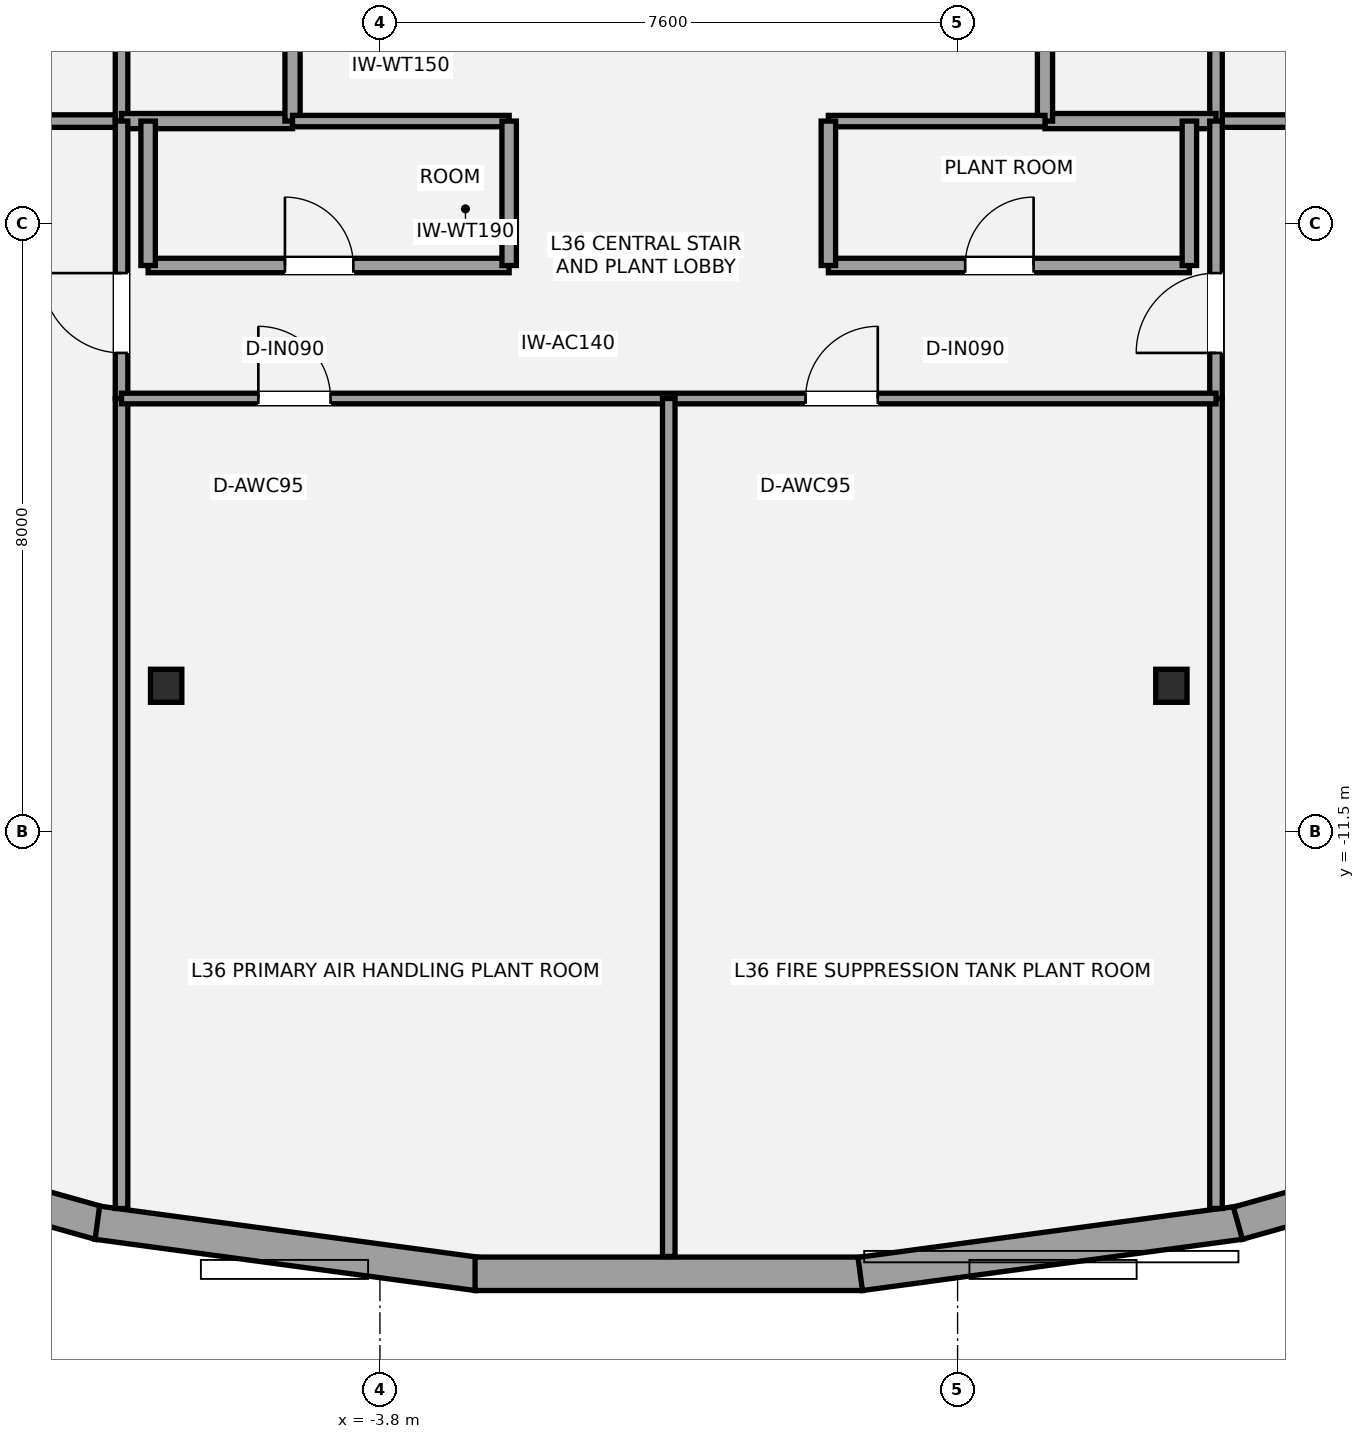
"""IFC4 building model, lengths in metres.
Left out: names, types, materials, properties, quantities, classifications, styles, units other than length and angle.
Written with IfcOpenShell. Run it as: python <this file> out.ifc"""

import sys

from ifc_helpers import new_model, si_unit, direction, frame, frame_2d, origin, origin_2d, place, context, subcontext, project, spatial, rectangle, i_section, extrude, element, fill, save


model = new_model("IFC4")
c1 = context("Model", 3, precision=1e-05, world=origin(), true_north=direction((0.0, 1.0)))
c2 = subcontext(c1, "Body", "Model", "MODEL_VIEW")
j1 = project(units=[si_unit("LENGTHUNIT", "METRE"), si_unit("PLANEANGLEUNIT", "RADIAN")], contexts=[c1])
p1 = place(None, origin())
s1 = spatial("IfcSite", under=j1, at=p1, CompositionType="ELEMENT")
p2 = place(p1, origin())
s2 = spatial("IfcBuilding", under=s1, at=p2, CompositionType="ELEMENT")
p3 = place(p2, frame((0.0, 0.0, 135.1)))
s3 = spatial("IfcBuildingStorey", under=s2, at=p3, CompositionType="ELEMENT", Elevation=135.1)
for number, where, z_axis, x_axis in (
    (1, (-6.613, -9.579, 0.0), (0.0, 0.0, 1.0), (1.0, 0.0, 0.0)),
    (2, (6.613, -9.579, 0.0), (0.0, 0.0, 1.0), (1.0, 0.0, 0.0)),
):
    element("IfcColumn", number, at=place(p3, frame(where, z_axis=z_axis, x_axis=x_axis)), inside=s3, PredefinedType="COLUMN", context=c2, shape_type="SweptSolid", body=[
        extrude(i_section(OverallWidth=0.412, OverallDepth=0.435, WebThickness=0.036, FlangeThickness=0.057, at=origin_2d()), origin(), (0.0, 0.0, 1.0), 4.5),
    ])
p4 = place(p3, frame((-7.488, -16.649, 0.0), z_axis=(0.0, 0.0, 1.0), x_axis=(-0.962790668442, 0.270248272446, 0.0)))
e3 = element("IfcWall", 3, at=p4, inside=s3, PredefinedType="STANDARD", context=c2, shape_type="SweptSolid", body=[
    extrude(rectangle(XDim=4.891, YDim=0.44, at=frame_2d((2.445, 0.0))), origin(), (0.0, 0.0, 1.0), 3.498),
])
p5 = place(p3, frame((-2.519, -17.317, 0.0), z_axis=(0.0, 0.0, 1.0), x_axis=(-0.99103751038, 0.133583880086, 0.0)))
e4 = element("IfcWall", 4, at=p5, inside=s3, PredefinedType="STANDARD", context=c2, shape_type="SweptSolid", body=[
    extrude(rectangle(XDim=5.044, YDim=0.44, at=frame_2d((2.522, 0.0))), origin(), (0.0, 0.0, 1.0), 3.498),
])
p6 = place(p3, frame((2.548, -17.315, 0.0), z_axis=(0.0, 0.0, 1.0), x_axis=(-1.0, 0.0, 0.0)))
e5 = element("IfcWall", 5, at=p6, inside=s3, PredefinedType="STANDARD", context=c2, shape_type="SweptSolid", body=[
    extrude(rectangle(XDim=5.097, YDim=0.44, at=frame_2d((2.548, 0.0))), origin(), (0.0, 0.0, 1.0), 3.498),
])
p7 = place(p3, frame((7.518, -16.643, 0.0), z_axis=(0.0, 0.0, 1.0), x_axis=(-0.99103751038, -0.133583880086, 0.0)))
e6 = element("IfcWall", 6, at=p7, inside=s3, PredefinedType="STANDARD", context=c2, shape_type="SweptSolid", body=[
    extrude(rectangle(XDim=5.044, YDim=0.44, at=frame_2d((2.522, 0.0))), origin(), (0.0, 0.0, 1.0), 3.498),
])
p8 = place(p3, frame((12.197, -15.328, 0.0), z_axis=(0.0, 0.0, 1.0), x_axis=(-0.962790668442, -0.270248272446, 0.0)))
e7 = element("IfcWall", 7, at=p8, inside=s3, PredefinedType="STANDARD", context=c2, shape_type="SweptSolid", body=[
    extrude(rectangle(XDim=4.891, YDim=0.44, at=frame_2d((2.445, 0.0))), origin(), (0.0, 0.0, 1.0), 3.498),
])
p9 = place(p3, frame((-13.45, -2.15, 0.0), z_axis=(0.0, 0.0, 1.0), x_axis=(1.0, 0.0, 0.0)))
e8 = element("IfcWall", 8, at=p9, inside=s3, PredefinedType="PARTITIONING", context=c2, shape_type="SweptSolid", body=[
    extrude(rectangle(XDim=6.25, YDim=0.165, at=frame_2d((3.125, 0.0))), origin(), (0.0, 0.0, 1.0), 4.28),
])
p10 = place(p9, frame((2.6, 0.0, 0.0)))
e9 = element("IfcOpeningElement", 9, at=p10, cuts=e8, PredefinedType="OPENING", context=c2, shape_type="SweptSolid", body=[
    extrude(rectangle(XDim=1.05, YDim=2.15, at=frame_2d((0.525, 1.075))), frame((0.0, 0.093, 0.0), z_axis=(0.0, -1.0, 0.0), x_axis=(1.0, 0.0, 0.0)), (0.0, 0.0, 1.0), 0.185),
])
p11 = place(p3, frame((-7.2, -2.15, 0.0), z_axis=(0.0, 0.0, 1.0), x_axis=(0.0, 1.0, 0.0)))
e10 = element("IfcWall", 10, at=p11, inside=s3, PredefinedType="PARTITIONING", context=c2, shape_type="SweptSolid", body=[
    extrude(rectangle(XDim=3.4, YDim=0.165, at=frame_2d((1.7, 0.0))), origin(), (0.0, 0.0, 1.0), 3.733),
])
p12 = place(p3, frame((-7.2, -2.15, 0.0), z_axis=(0.0, 0.0, 1.0), x_axis=(1.0, 0.0, 0.0)))
e11 = element("IfcWall", 11, at=p12, inside=s3, PredefinedType="SOLIDWALL", context=c2, shape_type="SweptSolid", body=[
    extrude(rectangle(XDim=2.25, YDim=0.2, at=frame_2d((1.125, 0.0))), origin(), (0.0, 0.0, 1.0), 2.47),
])
p13 = place(p3, frame((-4.95, -2.15, 0.0), z_axis=(0.0, 0.0, 1.0), x_axis=(0.0, 1.0, 0.0)))
e12 = element("IfcWall", 12, at=p13, inside=s3, PredefinedType="SOLIDWALL", context=c2, shape_type="SweptSolid", body=[
    extrude(rectangle(XDim=3.4, YDim=0.2, at=frame_2d((1.7, 0.0))), origin(), (0.0, 0.0, 1.0), 2.47),
])
p14 = place(p13, frame((0.95, 0.0, 0.0)))
e13 = element("IfcOpeningElement", 13, at=p14, cuts=e12, PredefinedType="OPENING", context=c2, shape_type="SweptSolid", body=[
    extrude(rectangle(XDim=0.75, YDim=2.1, at=frame_2d((0.375, 1.05))), frame((0.0, 0.11, 0.0), z_axis=(0.0, -1.0, 0.0), x_axis=(1.0, 0.0, 0.0)), (0.0, 0.0, 1.0), 0.22),
])
p15 = place(p3, frame((7.2, -2.15, 0.0), z_axis=(0.0, 0.0, 1.0), x_axis=(1.0, 0.0, 0.0)))
e14 = element("IfcWall", 14, at=p15, inside=s3, PredefinedType="PARTITIONING", context=c2, shape_type="SweptSolid", body=[
    extrude(rectangle(XDim=6.25, YDim=0.165, at=frame_2d((3.125, 0.0))), origin(), (0.0, 0.0, 1.0), 4.28),
])
p16 = place(p15, frame((1.4, 0.0, 0.0)))
e15 = element("IfcOpeningElement", 15, at=p16, cuts=e14, PredefinedType="OPENING", context=c2, shape_type="SweptSolid", body=[
    extrude(rectangle(XDim=1.05, YDim=2.15, at=frame_2d((0.525, 1.075))), frame((0.0, 0.093, 0.0), z_axis=(0.0, -1.0, 0.0), x_axis=(1.0, 0.0, 0.0)), (0.0, 0.0, 1.0), 0.185),
])
p17 = place(p3, frame((7.2, -2.15, 0.0), z_axis=(0.0, 0.0, 1.0), x_axis=(0.0, 1.0, 0.0)))
e16 = element("IfcWall", 16, at=p17, inside=s3, PredefinedType="PARTITIONING", context=c2, shape_type="SweptSolid", body=[
    extrude(rectangle(XDim=3.4, YDim=0.165, at=frame_2d((1.7, 0.0))), origin(), (0.0, 0.0, 1.0), 4.28),
])
p18 = place(p3, frame((4.95, -2.15, 0.0), z_axis=(0.0, 0.0, 1.0), x_axis=(1.0, 0.0, 0.0)))
e17 = element("IfcWall", 17, at=p18, inside=s3, PredefinedType="SOLIDWALL", context=c2, shape_type="SweptSolid", body=[
    extrude(rectangle(XDim=2.25, YDim=0.2, at=frame_2d((1.125, 0.0))), origin(), (0.0, 0.0, 1.0), 2.47),
])
p19 = place(p3, frame((4.95, -2.15, 0.0), z_axis=(0.0, 0.0, 1.0), x_axis=(0.0, 1.0, 0.0)))
e18 = element("IfcWall", 18, at=p19, inside=s3, PredefinedType="SOLIDWALL", context=c2, shape_type="SweptSolid", body=[
    extrude(rectangle(XDim=3.4, YDim=0.2, at=frame_2d((1.7, 0.0))), origin(), (0.0, 0.0, 1.0), 2.47),
])
p20 = place(p19, frame((0.95, 0.0, 0.0)))
e19 = element("IfcOpeningElement", 19, at=p20, cuts=e18, PredefinedType="OPENING", context=c2, shape_type="SweptSolid", body=[
    extrude(rectangle(XDim=0.75, YDim=2.1, at=frame_2d((0.375, 1.05))), frame((0.0, 0.11, 0.0), z_axis=(0.0, -1.0, 0.0), x_axis=(1.0, 0.0, 0.0)), (0.0, 0.0, 1.0), 0.22),
])
p21 = place(p3, frame((-6.85, -4.05, 0.0), z_axis=(0.0, 0.0, 1.0), x_axis=(1.0, 0.0, 0.0)))
e20 = element("IfcWall", 20, at=p21, inside=s3, PredefinedType="PLUMBINGWALL", context=c2, shape_type="SweptSolid", body=[
    extrude(rectangle(XDim=4.75, YDim=0.19, at=frame_2d((2.375, 0.0))), origin(), (0.0, 0.0, 1.0), 2.47),
])
p22 = place(p21, frame((1.8, 0.0, 0.0)))
e21 = element("IfcOpeningElement", 21, at=p22, cuts=e20, PredefinedType="OPENING", context=c2, shape_type="SweptSolid", body=[
    extrude(rectangle(XDim=0.9, YDim=2.1, at=frame_2d((0.45, 1.05))), frame((0.0, 0.105, 0.0), z_axis=(0.0, -1.0, 0.0), x_axis=(1.0, 0.0, 0.0)), (0.0, 0.0, 1.0), 0.21),
])
p23 = place(p3, frame((-4.95, -2.15, 0.0), z_axis=(0.0, 0.0, 1.0), x_axis=(1.0, 0.0, 0.0)))
e22 = element("IfcWall", 22, at=p23, inside=s3, PredefinedType="PLUMBINGWALL", context=c2, shape_type="SweptSolid", body=[
    extrude(rectangle(XDim=2.85, YDim=0.15, at=frame_2d((1.425, 0.0))), origin(), (0.0, 0.0, 1.0), 3.733),
])
p24 = place(p3, frame((-6.85, -4.05, 0.0), z_axis=(0.0, 0.0, 1.0), x_axis=(0.0, 1.0, 0.0)))
e23 = element("IfcWall", 23, at=p24, inside=s3, PredefinedType="PLUMBINGWALL", context=c2, shape_type="SweptSolid", body=[
    extrude(rectangle(XDim=1.9, YDim=0.19, at=frame_2d((0.95, 0.0))), origin(), (0.0, 0.0, 1.0), 4.28),
])
p25 = place(p3, frame((-2.1, -4.05, 0.0), z_axis=(0.0, 0.0, 1.0), x_axis=(0.0, 1.0, 0.0)))
e24 = element("IfcWall", 24, at=p25, inside=s3, PredefinedType="PLUMBINGWALL", context=c2, shape_type="SweptSolid", body=[
    extrude(rectangle(XDim=1.9, YDim=0.19, at=frame_2d((0.95, 0.0))), origin(), (0.0, 0.0, 1.0), 3.733),
])
p26 = place(p3, frame((2.1, -4.05, 0.0), z_axis=(0.0, 0.0, 1.0), x_axis=(1.0, 0.0, 0.0)))
e25 = element("IfcWall", 25, at=p26, inside=s3, PredefinedType="PLUMBINGWALL", context=c2, shape_type="SweptSolid", body=[
    extrude(rectangle(XDim=4.75, YDim=0.19, at=frame_2d((2.375, 0.0))), origin(), (0.0, 0.0, 1.0), 2.47),
])
p27 = place(p26, frame((1.8, 0.0, 0.0)))
e26 = element("IfcOpeningElement", 26, at=p27, cuts=e25, PredefinedType="OPENING", context=c2, shape_type="SweptSolid", body=[
    extrude(rectangle(XDim=0.9, YDim=2.1, at=frame_2d((0.45, 1.05))), frame((0.0, 0.105, 0.0), z_axis=(0.0, -1.0, 0.0), x_axis=(1.0, 0.0, 0.0)), (0.0, 0.0, 1.0), 0.21),
])
p28 = place(p3, frame((2.1, -2.15, 0.0), z_axis=(0.0, 0.0, 1.0), x_axis=(1.0, 0.0, 0.0)))
e27 = element("IfcWall", 27, at=p28, inside=s3, PredefinedType="PLUMBINGWALL", context=c2, shape_type="SweptSolid", body=[
    extrude(rectangle(XDim=2.85, YDim=0.15, at=frame_2d((1.425, 0.0))), origin(), (0.0, 0.0, 1.0), 4.28),
])
for number, where, z_axis, x_axis in (
    (28, (2.1, -4.05, 0.0), (0.0, 0.0, 1.0), (0.0, 1.0, 0.0)),
    (29, (6.85, -4.05, 0.0), (0.0, 0.0, 1.0), (0.0, 1.0, 0.0)),
):
    element("IfcWall", number, at=place(p3, frame(where, z_axis=z_axis, x_axis=x_axis)), inside=s3, PredefinedType="PLUMBINGWALL", context=c2, shape_type="SweptSolid", body=[
        extrude(rectangle(XDim=1.9, YDim=0.19, at=frame_2d((0.95, 0.0))), origin(), (0.0, 0.0, 1.0), 4.28),
    ])
p29 = place(p3, frame((-7.2, -5.8, 0.0), z_axis=(0.0, 0.0, 1.0), x_axis=(0.0, 1.0, 0.0)))
e30 = element("IfcWall", 30, at=p29, inside=s3, PredefinedType="PARTITIONING", context=c2, shape_type="SweptSolid", body=[
    extrude(rectangle(XDim=3.65, YDim=0.165, at=frame_2d((1.825, 0.0))), origin(), (0.0, 0.0, 1.0), 3.733),
])
p30 = place(p29, frame((0.6, 0.0, 0.0)))
e31 = element("IfcOpeningElement", 31, at=p30, cuts=e30, PredefinedType="OPENING", context=c2, shape_type="SweptSolid", body=[
    extrude(rectangle(XDim=1.05, YDim=2.15, at=frame_2d((0.525, 1.075))), frame((0.0, 0.093, 0.0), z_axis=(0.0, -1.0, 0.0), x_axis=(1.0, 0.0, 0.0)), (0.0, 0.0, 1.0), 0.185),
])
p31 = place(p3, frame((7.2, -5.8, 0.0), z_axis=(0.0, 0.0, 1.0), x_axis=(0.0, 1.0, 0.0)))
e32 = element("IfcWall", 32, at=p31, inside=s3, PredefinedType="PARTITIONING", context=c2, shape_type="SweptSolid", body=[
    extrude(rectangle(XDim=3.65, YDim=0.165, at=frame_2d((1.825, 0.0))), origin(), (0.0, 0.0, 1.0), 4.28),
])
p32 = place(p31, frame((0.6, 0.0, 0.0)))
e33 = element("IfcOpeningElement", 33, at=p32, cuts=e32, PredefinedType="OPENING", context=c2, shape_type="SweptSolid", body=[
    extrude(rectangle(XDim=1.05, YDim=2.15, at=frame_2d((0.525, 1.075))), frame((0.0, 0.093, 0.0), z_axis=(0.0, -1.0, 0.0), x_axis=(1.0, 0.0, 0.0)), (0.0, 0.0, 1.0), 0.185),
])
p33 = place(p3, frame((-7.2, -16.456, 0.0), z_axis=(0.0, 0.0, 1.0), x_axis=(0.0, 1.0, 0.0)))
e34 = element("IfcWall", 34, at=p33, inside=s3, PredefinedType="PARTITIONING", context=c2, shape_type="SweptSolid", body=[
    extrude(rectangle(XDim=10.656, YDim=0.165, at=frame_2d((5.328, 0.0))), origin(), (0.0, 0.0, 1.0), 3.733),
])
p34 = place(p3, frame((7.2, -16.456, 0.0), z_axis=(0.0, 0.0, 1.0), x_axis=(0.0, 1.0, 0.0)))
e35 = element("IfcWall", 35, at=p34, inside=s3, PredefinedType="PARTITIONING", context=c2, shape_type="SweptSolid", body=[
    extrude(rectangle(XDim=10.656, YDim=0.165, at=frame_2d((5.328, 0.0))), origin(), (0.0, 0.0, 1.0), 4.28),
])
p35 = place(p3, frame((-7.2, -5.8, 0.0), z_axis=(0.0, 0.0, 1.0), x_axis=(1.0, 0.0, 0.0)))
e36 = element("IfcWall", 36, at=p35, inside=s3, PredefinedType="PARTITIONING", context=c2, shape_type="SweptSolid", body=[
    extrude(rectangle(XDim=14.4, YDim=0.14, at=frame_2d((7.2, 0.0))), origin(), (0.0, 0.0, 1.0), 2.47),
])
p36 = place(p35, frame((1.8, 0.0, 0.0)))
e37 = element("IfcOpeningElement", 37, at=p36, cuts=e36, PredefinedType="OPENING", context=c2, shape_type="SweptSolid", body=[
    extrude(rectangle(XDim=0.95, YDim=2.15, at=frame_2d((0.475, 1.075))), frame((0.0, 0.08, 0.0), z_axis=(0.0, -1.0, 0.0), x_axis=(1.0, 0.0, 0.0)), (0.0, 0.0, 1.0), 0.16),
])
p37 = place(p35, frame((9.0, 0.0, 0.0)))
e38 = element("IfcOpeningElement", 38, at=p37, cuts=e36, PredefinedType="OPENING", context=c2, shape_type="SweptSolid", body=[
    extrude(rectangle(XDim=0.95, YDim=2.15, at=frame_2d((0.475, 1.075))), frame((0.0, 0.08, 0.0), z_axis=(0.0, -1.0, 0.0), x_axis=(1.0, 0.0, 0.0)), (0.0, 0.0, 1.0), 0.16),
])
p38 = place(p3, frame((0.0, -17.087, 0.0), z_axis=(0.0, 0.0, 1.0), x_axis=(0.0, 1.0, 0.0)))
e39 = element("IfcWall", 39, at=p38, inside=s3, PredefinedType="PARTITIONING", context=c2, shape_type="SweptSolid", body=[
    extrude(rectangle(XDim=11.287, YDim=0.165, at=frame_2d((5.644, 0.0))), origin(), (0.0, 0.0, 1.0), 3.733),
])
p39 = place(p22, origin())
e40 = element("IfcDoor", 40, at=p39, inside=s3, OperationType="SINGLE_SWING_LEFT", PredefinedType="DOOR", context=c2, shape_type="SweptSolid", body=[
    extrude(rectangle(XDim=0.9, YDim=2.1, at=frame_2d((0.45, 1.05))), frame((0.0, 0.025, 0.0), z_axis=(0.0, -1.0, 0.0), x_axis=(1.0, 0.0, 0.0)), (0.0, 0.0, 1.0), 0.05),
])
fill(e21, e40)
p40 = place(p27, origin())
e41 = element("IfcDoor", 41, at=p40, inside=s3, OperationType="SINGLE_SWING_RIGHT", PredefinedType="DOOR", context=c2, shape_type="SweptSolid", body=[
    extrude(rectangle(XDim=0.9, YDim=2.1, at=frame_2d((0.45, 1.05))), frame((0.0, 0.025, 0.0), z_axis=(0.0, -1.0, 0.0), x_axis=(1.0, 0.0, 0.0)), (0.0, 0.0, 1.0), 0.05),
])
fill(e26, e41)
p41 = place(p30, origin())
e42 = element("IfcDoor", 42, at=p41, inside=s3, OperationType="SINGLE_SWING_RIGHT", PredefinedType="DOOR", context=c2, shape_type="SweptSolid", body=[
    extrude(rectangle(XDim=1.05, YDim=2.15, at=frame_2d((0.525, 1.075))), frame((0.0, 0.025, 0.0), z_axis=(0.0, -1.0, 0.0), x_axis=(1.0, 0.0, 0.0)), (0.0, 0.0, 1.0), 0.05),
])
fill(e31, e42)
p42 = place(p32, origin())
e43 = element("IfcDoor", 43, at=p42, inside=s3, OperationType="SINGLE_SWING_LEFT", PredefinedType="DOOR", context=c2, shape_type="SweptSolid", body=[
    extrude(rectangle(XDim=1.05, YDim=2.15, at=frame_2d((0.525, 1.075))), frame((0.0, 0.025, 0.0), z_axis=(0.0, -1.0, 0.0), x_axis=(1.0, 0.0, 0.0)), (0.0, 0.0, 1.0), 0.05),
])
fill(e33, e43)
p43 = place(p36, origin())
e44 = element("IfcDoor", 44, at=p43, inside=s3, OperationType="SINGLE_SWING_LEFT", PredefinedType="DOOR", context=c2, shape_type="SweptSolid", body=[
    extrude(rectangle(XDim=0.95, YDim=2.15, at=frame_2d((0.475, 1.075))), frame((0.0, 0.025, 0.0), z_axis=(0.0, -1.0, 0.0), x_axis=(1.0, 0.0, 0.0)), (0.0, 0.0, 1.0), 0.05),
])
fill(e37, e44)
p44 = place(p37, origin())
e45 = element("IfcDoor", 45, at=p44, inside=s3, OperationType="SINGLE_SWING_RIGHT", PredefinedType="DOOR", context=c2, shape_type="SweptSolid", body=[
    extrude(rectangle(XDim=0.95, YDim=2.15, at=frame_2d((0.475, 1.075))), frame((0.0, 0.025, 0.0), z_axis=(0.0, -1.0, 0.0), x_axis=(1.0, 0.0, 0.0)), (0.0, 0.0, 1.0), 0.05),
])
fill(e38, e45)
save(model, sys.argv[1])
